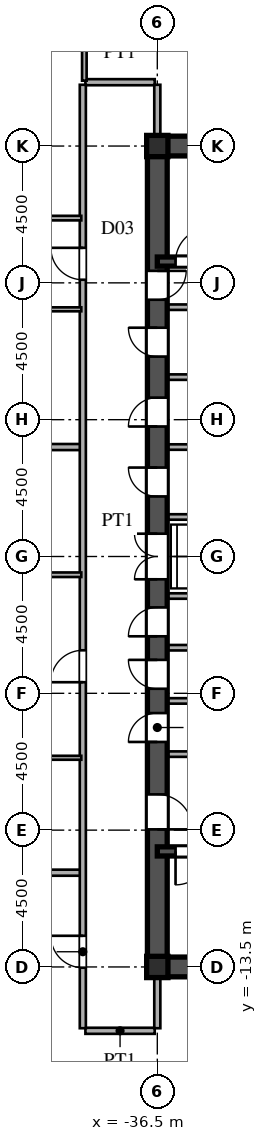
"""IFC4 building model, lengths in metres.
Left out: names, types, materials, properties, quantities, classifications, styles, units other than length and angle.
Written with IfcOpenShell. Run it as: python <this file> out.ifc"""

import sys

from ifc_helpers import new_model, si_unit, direction, frame, frame_2d, origin, origin_2d, place, context, subcontext, project, spatial, rectangle, i_section, extrude, source, transform, mapped, element, fill, save


model = new_model("IFC4")
c1 = context("Model", 3, precision=1e-05, world=origin(), true_north=direction((0.0, 1.0)))
c2 = subcontext(c1, "Body", "Model", "MODEL_VIEW")
j1 = project(units=[si_unit("LENGTHUNIT", "METRE"), si_unit("PLANEANGLEUNIT", "RADIAN")], contexts=[c1])
p1 = place(None, origin())
s1 = spatial("IfcSite", under=j1, at=p1, CompositionType="ELEMENT")
p2 = place(p1, origin())
s2 = spatial("IfcBuilding", under=s1, at=p2, CompositionType="ELEMENT")
p3 = place(p2, frame((0.0, 0.0, 124.8)))
s3 = spatial("IfcBuildingStorey", under=s2, at=p3, CompositionType="ELEMENT", Elevation=124.8)
m1 = source(origin(), c2, "Body", "SweptSolid", [
    extrude(i_section(OverallWidth=0.7, OverallDepth=0.7, WebThickness=0.028, FlangeThickness=0.045, at=origin_2d()), origin(), (0.0, 0.0, 1.0), 3.6),
])
for number, where, z_axis, x_axis in (
    (1, (-36.5, -13.5, 0.0), (0.0, 0.0, 1.0), (1.0, 0.0, 0.0)),
    (2, (-36.5, 13.5, 0.0), (0.0, 0.0, 1.0), (1.0, 0.0, 0.0)),
):
    element("IfcColumn", number, at=place(p3, frame(where, z_axis=z_axis, x_axis=x_axis)), inside=s3, PredefinedType="COLUMN", context=c2, shape_type="MappedRepresentation", body=[
        mapped(m1, transform((0.0, 0.0, 0.0), scale=1.0)),
    ])
for number, where, z_axis, x_axis in (
    (3, (-36.5, -13.5, 0.0), (0.0, 0.0, 1.0), (1.0, 0.0, 0.0)),
    (4, (-36.5, 13.5, 0.0), (0.0, 0.0, 1.0), (1.0, 0.0, 0.0)),
):
    element("IfcWall", number, at=place(p3, frame(where, z_axis=z_axis, x_axis=x_axis)), inside=s3, PredefinedType="SHEAR", context=c2, shape_type="SweptSolid", body=[
        extrude(rectangle(XDim=9.0, YDim=0.65, at=frame_2d((4.5, 0.0))), origin(), (0.0, 0.0, 1.0), 3.38),
    ])
p4 = place(p3, frame((-36.5, -13.65, 0.0), z_axis=(0.0, 0.0, 1.0), x_axis=(0.0, 1.0, 0.0)))
e5 = element("IfcWall", 5, at=p4, inside=s3, PredefinedType="SHEAR", context=c2, shape_type="SweptSolid", body=[
    extrude(rectangle(XDim=7.15, YDim=0.65, at=frame_2d((3.575, 0.0))), origin(), (0.0, 0.0, 1.0), 3.38),
])
p5 = place(p4, frame((4.675, 0.0, 0.0)))
e6 = element("IfcOpeningElement", 6, at=p5, cuts=e5, PredefinedType="OPENING", context=c2, shape_type="SweptSolid", body=[
    extrude(rectangle(XDim=1.15, YDim=2.2, at=frame_2d((0.575, 1.1))), frame((0.0, 0.335, 0.0), z_axis=(0.0, -1.0, 0.0), x_axis=(1.0, 0.0, 0.0)), (0.0, 0.0, 1.0), 0.67),
])
p6 = place(p3, frame((-36.5, -1.3, 0.0), z_axis=(0.0, 0.0, 1.0), x_axis=(0.0, 1.0, 0.0)))
e7 = element("IfcWall", 7, at=p6, inside=s3, PredefinedType="SHEAR", context=c2, shape_type="SweptSolid", body=[
    extrude(rectangle(XDim=2.6, YDim=0.65, at=frame_2d((1.3, 0.0))), origin(), (0.0, 0.0, 1.0), 3.38),
])
p7 = place(p6, frame((0.55, 0.0, 0.0)))
e8 = element("IfcOpeningElement", 8, at=p7, cuts=e7, PredefinedType="OPENING", context=c2, shape_type="SweptSolid", body=[
    extrude(rectangle(XDim=1.5, YDim=2.3, at=frame_2d((0.75, 1.15))), frame((0.0, 0.335, 0.0), z_axis=(0.0, -1.0, 0.0), x_axis=(1.0, 0.0, 0.0)), (0.0, 0.0, 1.0), 0.67),
])
p8 = place(p3, frame((-36.5, 8.2, 0.0), z_axis=(0.0, 0.0, 1.0), x_axis=(0.0, 1.0, 0.0)))
e9 = element("IfcWall", 9, at=p8, inside=s3, PredefinedType="SHEAR", context=c2, shape_type="SweptSolid", body=[
    extrude(rectangle(XDim=5.45, YDim=0.65, at=frame_2d((2.725, 0.0))), origin(), (0.0, 0.0, 1.0), 3.38),
])
p9 = place(p8, frame((0.245, 0.0, 0.0)))
e10 = element("IfcOpeningElement", 10, at=p9, cuts=e9, PredefinedType="OPENING", context=c2, shape_type="SweptSolid", body=[
    extrude(rectangle(XDim=0.95, YDim=2.15, at=frame_2d((0.475, 1.075))), frame((0.0, 0.335, 0.0), z_axis=(0.0, -1.0, 0.0), x_axis=(1.0, 0.0, 0.0)), (0.0, 0.0, 1.0), 0.67),
])
p10 = place(p3, frame((-36.5, -6.5, 0.0), z_axis=(0.0, 0.0, 1.0), x_axis=(0.0, 1.0, 0.0)))
e11 = element("IfcWall", 11, at=p10, inside=s3, PredefinedType="SHEAR", context=c2, shape_type="SweptSolid", body=[
    extrude(rectangle(XDim=1.75, YDim=0.65, at=frame_2d((0.875, 0.0))), origin(), (0.0, 0.0, 1.0), 3.38),
])
p11 = place(p10, frame((0.4, 0.0, 0.0)))
e12 = element("IfcOpeningElement", 12, at=p11, cuts=e11, PredefinedType="OPENING", context=c2, shape_type="SweptSolid", body=[
    extrude(rectangle(XDim=0.95, YDim=2.15, at=frame_2d((0.475, 1.075))), frame((0.0, 0.335, 0.0), z_axis=(0.0, -1.0, 0.0), x_axis=(1.0, 0.0, 0.0)), (0.0, 0.0, 1.0), 0.67),
])
p12 = place(p3, frame((-36.5, -4.75, 0.0), z_axis=(0.0, 0.0, 1.0), x_axis=(0.0, 1.0, 0.0)))
e13 = element("IfcWall", 13, at=p12, inside=s3, PredefinedType="SHEAR", context=c2, shape_type="SweptSolid", body=[
    extrude(rectangle(XDim=1.75, YDim=0.65, at=frame_2d((0.875, 0.0))), origin(), (0.0, 0.0, 1.0), 3.38),
])
p13 = place(p12, frame((0.4, 0.0, 0.0)))
e14 = element("IfcOpeningElement", 14, at=p13, cuts=e13, PredefinedType="OPENING", context=c2, shape_type="SweptSolid", body=[
    extrude(rectangle(XDim=0.95, YDim=2.15, at=frame_2d((0.475, 1.075))), frame((0.0, 0.335, 0.0), z_axis=(0.0, -1.0, 0.0), x_axis=(1.0, 0.0, 0.0)), (0.0, 0.0, 1.0), 0.67),
])
p14 = place(p3, frame((-36.5, -3.0, 0.0), z_axis=(0.0, 0.0, 1.0), x_axis=(0.0, 1.0, 0.0)))
e15 = element("IfcWall", 15, at=p14, inside=s3, PredefinedType="SHEAR", context=c2, shape_type="SweptSolid", body=[
    extrude(rectangle(XDim=1.7, YDim=0.65, at=frame_2d((0.85, 0.0))), origin(), (0.0, 0.0, 1.0), 3.38),
])
p15 = place(p14, frame((0.375, 0.0, 0.0)))
e16 = element("IfcOpeningElement", 16, at=p15, cuts=e15, PredefinedType="OPENING", context=c2, shape_type="SweptSolid", body=[
    extrude(rectangle(XDim=0.95, YDim=2.15, at=frame_2d((0.475, 1.075))), frame((0.0, 0.335, 0.0), z_axis=(0.0, -1.0, 0.0), x_axis=(1.0, 0.0, 0.0)), (0.0, 0.0, 1.0), 0.67),
])
p16 = place(p3, frame((-36.5, 1.3, 0.0), z_axis=(0.0, 0.0, 1.0), x_axis=(0.0, 1.0, 0.0)))
e17 = element("IfcWall", 17, at=p16, inside=s3, PredefinedType="SHEAR", context=c2, shape_type="SweptSolid", body=[
    extrude(rectangle(XDim=2.3, YDim=0.65, at=frame_2d((1.15, 0.0))), origin(), (0.0, 0.0, 1.0), 3.38),
])
p17 = place(p16, frame((0.675, 0.0, 0.0)))
e18 = element("IfcOpeningElement", 18, at=p17, cuts=e17, PredefinedType="OPENING", context=c2, shape_type="SweptSolid", body=[
    extrude(rectangle(XDim=0.95, YDim=2.15, at=frame_2d((0.475, 1.075))), frame((0.0, 0.335, 0.0), z_axis=(0.0, -1.0, 0.0), x_axis=(1.0, 0.0, 0.0)), (0.0, 0.0, 1.0), 0.67),
])
p18 = place(p3, frame((-36.5, 3.6, 0.0), z_axis=(0.0, 0.0, 1.0), x_axis=(0.0, 1.0, 0.0)))
e19 = element("IfcWall", 19, at=p18, inside=s3, PredefinedType="SHEAR", context=c2, shape_type="SweptSolid", body=[
    extrude(rectangle(XDim=2.3, YDim=0.65, at=frame_2d((1.15, 0.0))), origin(), (0.0, 0.0, 1.0), 3.38),
])
p19 = place(p18, frame((0.675, 0.0, 0.0)))
e20 = element("IfcOpeningElement", 20, at=p19, cuts=e19, PredefinedType="OPENING", context=c2, shape_type="SweptSolid", body=[
    extrude(rectangle(XDim=0.95, YDim=2.15, at=frame_2d((0.475, 1.075))), frame((0.0, 0.335, 0.0), z_axis=(0.0, -1.0, 0.0), x_axis=(1.0, 0.0, 0.0)), (0.0, 0.0, 1.0), 0.67),
])
p20 = place(p3, frame((-36.5, 5.9, 0.0), z_axis=(0.0, 0.0, 1.0), x_axis=(0.0, 1.0, 0.0)))
e21 = element("IfcWall", 21, at=p20, inside=s3, PredefinedType="SHEAR", context=c2, shape_type="SweptSolid", body=[
    extrude(rectangle(XDim=2.3, YDim=0.65, at=frame_2d((1.15, 0.0))), origin(), (0.0, 0.0, 1.0), 3.38),
])
p21 = place(p20, frame((0.675, 0.0, 0.0)))
e22 = element("IfcOpeningElement", 22, at=p21, cuts=e21, PredefinedType="OPENING", context=c2, shape_type="SweptSolid", body=[
    extrude(rectangle(XDim=0.95, YDim=2.15, at=frame_2d((0.475, 1.075))), frame((0.0, 0.335, 0.0), z_axis=(0.0, -1.0, 0.0), x_axis=(1.0, 0.0, 0.0)), (0.0, 0.0, 1.0), 0.67),
])
p22 = place(p3, frame((-36.5, -9.7, 0.0), z_axis=(0.0, 0.0, 1.0), x_axis=(1.0, 0.0, 0.0)))
e23 = element("IfcWall", 23, at=p22, inside=s3, PredefinedType="SHEAR", context=c2, shape_type="SweptSolid", body=[
    extrude(rectangle(XDim=9.0, YDim=0.3, at=frame_2d((4.5, 0.0))), origin(), (0.0, 0.0, 1.0), 3.38),
])
p23 = place(p22, frame((0.6, 0.0, 0.0)))
e24 = element("IfcOpeningElement", 24, at=p23, cuts=e23, PredefinedType="OPENING", context=c2, shape_type="SweptSolid", body=[
    extrude(rectangle(XDim=1.1, YDim=2.2, at=frame_2d((0.55, 1.1))), frame((0.0, 0.16, 0.0), z_axis=(0.0, -1.0, 0.0), x_axis=(1.0, 0.0, 0.0)), (0.0, 0.0, 1.0), 0.32),
])
p24 = place(p3, frame((-36.5, 9.7, 0.0), z_axis=(0.0, 0.0, 1.0), x_axis=(1.0, 0.0, 0.0)))
e25 = element("IfcWall", 25, at=p24, inside=s3, PredefinedType="SHEAR", context=c2, shape_type="SweptSolid", body=[
    extrude(rectangle(XDim=9.0, YDim=0.3, at=frame_2d((4.5, 0.0))), origin(), (0.0, 0.0, 1.0), 3.38),
])
p25 = place(p24, frame((0.6, 0.0, 0.0)))
e26 = element("IfcOpeningElement", 26, at=p25, cuts=e25, PredefinedType="OPENING", context=c2, shape_type="SweptSolid", body=[
    extrude(rectangle(XDim=1.1, YDim=2.2, at=frame_2d((0.55, 1.1))), frame((0.0, 0.16, 0.0), z_axis=(0.0, -1.0, 0.0), x_axis=(1.0, 0.0, 0.0)), (0.0, 0.0, 1.0), 0.32),
])
for number, where, z_axis, x_axis in (
    (27, (-36.15, -6.5, 0.0), (0.0, 0.0, 1.0), (1.0, 0.0, 0.0)),
    (28, (-36.15, 8.2, 0.0), (0.0, 0.0, 1.0), (1.0, 0.0, 0.0)),
):
    element("IfcWall", number, at=place(p3, frame(where, z_axis=z_axis, x_axis=x_axis)), inside=s3, PredefinedType="PARTITIONING", context=c2, shape_type="SweptSolid", body=[
        extrude(rectangle(XDim=5.7, YDim=0.18, at=frame_2d((2.85, 0.0))), origin(), (0.0, 0.0, 1.0), 3.38),
    ])
for number, where, z_axis, x_axis in (
    (29, (-36.15, -1.3, 0.0), (0.0, 0.0, 1.0), (1.0, 0.0, 0.0)),
    (30, (-36.15, 1.3, 0.0), (0.0, 0.0, 1.0), (1.0, 0.0, 0.0)),
    (31, (-36.15, -4.75, 0.0), (0.0, 0.0, 1.0), (1.0, 0.0, 0.0)),
    (32, (-36.15, -3.0, 0.0), (0.0, 0.0, 1.0), (1.0, 0.0, 0.0)),
    (33, (-36.15, 3.6, 0.0), (0.0, 0.0, 1.0), (1.0, 0.0, 0.0)),
    (34, (-36.15, 5.9, 0.0), (0.0, 0.0, 1.0), (1.0, 0.0, 0.0)),
):
    element("IfcWall", number, at=place(p3, frame(where, z_axis=z_axis, x_axis=x_axis)), inside=s3, PredefinedType="PARTITIONING", context=c2, shape_type="SweptSolid", body=[
        extrude(rectangle(XDim=2.95, YDim=0.18, at=frame_2d((1.475, 0.0))), origin(), (0.0, 0.0, 1.0), 3.38),
    ])
p26 = place(p3, frame((-38.865, -15.6, 0.0), z_axis=(0.0, 0.0, 1.0), x_axis=(1.0, 0.0, 0.0)))
e35 = element("IfcWall", 35, at=p26, inside=s3, PredefinedType="PARTITIONING", context=c2, shape_type="SweptSolid", body=[
    extrude(rectangle(XDim=2.28, YDim=0.2, at=frame_2d((1.14, 0.0))), origin(), (0.0, 0.0, 1.0), 3.38),
])
p27 = place(p3, frame((-58.988, -10.4, 0.0), z_axis=(0.0, 0.0, 1.0), x_axis=(1.0, 0.0, 0.0)))
e36 = element("IfcWall", 36, at=p27, inside=s3, PredefinedType="PARTITIONING", context=c2, shape_type="SweptSolid", body=[
    extrude(rectangle(XDim=19.958, YDim=0.2, at=frame_2d((9.979, 0.0))), origin(), (0.0, 0.0, 1.0), 3.38),
])
p28 = place(p3, frame((-42.35, -6.62, 0.0), z_axis=(0.0, 0.0, 1.0), x_axis=(1.0, 0.0, 0.0)))
e37 = element("IfcWall", 37, at=p28, inside=s3, PredefinedType="PARTITIONING", context=c2, shape_type="SweptSolid", body=[
    extrude(rectangle(XDim=3.35, YDim=0.13, at=frame_2d((1.675, 0.0))), origin(), (0.0, 0.0, 1.0), 3.38),
])
p29 = place(p28, frame((1.235, 0.0, 0.0)))
e38 = element("IfcOpeningElement", 38, at=p29, cuts=e37, PredefinedType="OPENING", context=c2, shape_type="SweptSolid", body=[
    extrude(rectangle(XDim=0.88, YDim=2.1, at=frame_2d((0.44, 1.05))), frame((0.0, 0.075, 0.0), z_axis=(0.0, -1.0, 0.0), x_axis=(1.0, 0.0, 0.0)), (0.0, 0.0, 1.0), 0.15),
])
p30 = place(p3, frame((-42.35, -0.6, 0.0), z_axis=(0.0, 0.0, 1.0), x_axis=(1.0, 0.0, 0.0)))
e39 = element("IfcWall", 39, at=p30, inside=s3, PredefinedType="PARTITIONING", context=c2, shape_type="SweptSolid", body=[
    extrude(rectangle(XDim=3.35, YDim=0.15, at=frame_2d((1.675, 0.0))), origin(), (0.0, 0.0, 1.0), 3.38),
])
p31 = place(p30, frame((1.2, 0.0, 0.0)))
e40 = element("IfcOpeningElement", 40, at=p31, cuts=e39, PredefinedType="OPENING", context=c2, shape_type="SweptSolid", body=[
    extrude(rectangle(XDim=0.95, YDim=2.15, at=frame_2d((0.475, 1.075))), frame((0.0, 0.085, 0.0), z_axis=(0.0, -1.0, 0.0), x_axis=(1.0, 0.0, 0.0)), (0.0, 0.0, 1.0), 0.17),
])
p32 = place(p3, frame((-69.505, 3.6, 0.0), z_axis=(0.0, 0.0, 1.0), x_axis=(1.0, 0.0, 0.0)))
e41 = element("IfcWall", 41, at=p32, inside=s3, PredefinedType="PARTITIONING", context=c2, shape_type="SweptSolid", body=[
    extrude(rectangle(XDim=30.475, YDim=0.2, at=frame_2d((15.237, 0.0))), origin(), (0.0, 0.0, 1.0), 3.38),
])
p33 = place(p3, frame((-42.35, 8.13, 0.0), z_axis=(0.0, 0.0, 1.0), x_axis=(1.0, 0.0, 0.0)))
e42 = element("IfcWall", 42, at=p33, inside=s3, PredefinedType="PARTITIONING", context=c2, shape_type="SweptSolid", body=[
    extrude(rectangle(XDim=3.35, YDim=0.13, at=frame_2d((1.675, 0.0))), origin(), (0.0, 0.0, 1.0), 3.38),
])
p34 = place(p33, frame((1.235, 0.0, 0.0)))
e43 = element("IfcOpeningElement", 43, at=p34, cuts=e42, PredefinedType="OPENING", context=c2, shape_type="SweptSolid", body=[
    extrude(rectangle(XDim=0.88, YDim=2.1, at=frame_2d((0.44, 1.05))), frame((0.0, 0.075, 0.0), z_axis=(0.0, -1.0, 0.0), x_axis=(1.0, 0.0, 0.0)), (0.0, 0.0, 1.0), 0.15),
])
p35 = place(p3, frame((-42.35, 11.13, 0.0), z_axis=(0.0, 0.0, 1.0), x_axis=(1.0, 0.0, 0.0)))
e44 = element("IfcWall", 44, at=p35, inside=s3, PredefinedType="PARTITIONING", context=c2, shape_type="SweptSolid", body=[
    extrude(rectangle(XDim=3.35, YDim=0.15, at=frame_2d((1.675, 0.0))), origin(), (0.0, 0.0, 1.0), 3.38),
])
p36 = place(p35, frame((1.2, 0.0, 0.0)))
e45 = element("IfcOpeningElement", 45, at=p36, cuts=e44, PredefinedType="OPENING", context=c2, shape_type="SweptSolid", body=[
    extrude(rectangle(XDim=0.95, YDim=2.15, at=frame_2d((0.475, 1.075))), frame((0.0, 0.085, 0.0), z_axis=(0.0, -1.0, 0.0), x_axis=(1.0, 0.0, 0.0)), (0.0, 0.0, 1.0), 0.17),
])
p37 = place(p3, frame((-38.865, 15.6, 0.0), z_axis=(0.0, 0.0, 1.0), x_axis=(1.0, 0.0, 0.0)))
e46 = element("IfcWall", 46, at=p37, inside=s3, PredefinedType="PARTITIONING", context=c2, shape_type="SweptSolid", body=[
    extrude(rectangle(XDim=2.28, YDim=0.2, at=frame_2d((1.14, 0.0))), origin(), (0.0, 0.0, 1.0), 3.38),
])
p38 = place(p3, frame((-38.95, -15.515, 0.0), z_axis=(0.0, 0.0, 1.0), x_axis=(0.0, 1.0, 0.0)))
e47 = element("IfcWall", 47, at=p38, inside=s3, PredefinedType="PARTITIONING", context=c2, shape_type="SweptSolid", body=[
    extrude(rectangle(XDim=31.03, YDim=0.2, at=frame_2d((15.515, 0.0))), origin(), (0.0, 0.0, 1.0), 3.38),
])
p39 = place(p38, frame((1.99, 0.0, 0.0)))
e48 = element("IfcOpeningElement", 48, at=p39, cuts=e47, PredefinedType="OPENING", context=c2, shape_type="SweptSolid", body=[
    extrude(rectangle(XDim=1.05, YDim=2.25, at=frame_2d((0.525, 1.125))), frame((0.0, 0.11, 0.0), z_axis=(0.0, -1.0, 0.0), x_axis=(1.0, 0.0, 0.0)), (0.0, 0.0, 1.0), 0.22),
])
p40 = place(p38, frame((11.38, 0.0, 0.0)))
e49 = element("IfcOpeningElement", 49, at=p40, cuts=e47, PredefinedType="OPENING", context=c2, shape_type="SweptSolid", body=[
    extrude(rectangle(XDim=1.05, YDim=2.25, at=frame_2d((0.525, 1.125))), frame((0.0, 0.11, 0.0), z_axis=(0.0, -1.0, 0.0), x_axis=(1.0, 0.0, 0.0)), (0.0, 0.0, 1.0), 0.22),
])
p41 = place(p38, frame((24.617, 0.0, 0.0)))
e50 = element("IfcOpeningElement", 50, at=p41, cuts=e47, PredefinedType="OPENING", context=c2, shape_type="SweptSolid", body=[
    extrude(rectangle(XDim=1.05, YDim=2.25, at=frame_2d((0.525, 1.125))), frame((0.0, 0.11, 0.0), z_axis=(0.0, -1.0, 0.0), x_axis=(1.0, 0.0, 0.0)), (0.0, 0.0, 1.0), 0.22),
])
p42 = place(p3, frame((-38.9, 15.65, 0.0), z_axis=(0.0, 0.0, 1.0), x_axis=(0.0, 1.0, 0.0)))
e51 = element("IfcWall", 51, at=p42, inside=s3, PredefinedType="PARTITIONING", context=c2, shape_type="SweptSolid", body=[
    extrude(rectangle(XDim=5.088, YDim=0.15, at=frame_2d((2.544, 0.0))), origin(), (0.0, 0.0, 1.0), 3.38),
])
p43 = place(p42, frame((1.175, 0.0, 0.0)))
e52 = element("IfcOpeningElement", 52, at=p43, cuts=e51, PredefinedType="OPENING", context=c2, shape_type="SweptSolid", body=[
    extrude(rectangle(XDim=0.95, YDim=2.15, at=frame_2d((0.475, 1.075))), frame((0.0, 0.085, 0.0), z_axis=(0.0, -1.0, 0.0), x_axis=(1.0, 0.0, 0.0)), (0.0, 0.0, 1.0), 0.17),
])
for number, where, z_axis, x_axis in (
    (53, (-36.5, -15.515, 0.0), (0.0, 0.0, 1.0), (0.0, 1.0, 0.0)),
    (54, (-36.5, 13.83, 0.0), (0.0, 0.0, 1.0), (0.0, 1.0, 0.0)),
):
    element("IfcWall", number, at=place(p3, frame(where, z_axis=z_axis, x_axis=x_axis)), inside=s3, PredefinedType="PARTITIONING", context=c2, shape_type="SweptSolid", body=[
        extrude(rectangle(XDim=1.685, YDim=0.2, at=frame_2d((0.842, 0.0))), origin(), (0.0, 0.0, 1.0), 2.78),
    ])
m2 = source(origin(), c2, "Body", "SweptSolid", [
    extrude(rectangle(XDim=1.15, YDim=2.2, at=frame_2d((0.575, 1.1))), frame((0.0, 0.025, 0.0), z_axis=(0.0, -1.0, 0.0), x_axis=(1.0, 0.0, 0.0)), (0.0, 0.0, 1.0), 0.05),
])
p44 = place(p5, frame((1.15, 0.0, 0.0), z_axis=(0.0, 0.0, 1.0), x_axis=(-1.0, 0.0, 0.0)))
e55 = element("IfcDoor", 55, at=p44, inside=s3, OperationType="SINGLE_SWING_LEFT", PredefinedType="DOOR", context=c2, shape_type="MappedRepresentation", body=[
    mapped(m2, transform((0.0, 0.0, 0.0), scale=1.0)),
])
fill(e6, e55)
m3 = source(origin(), c2, "Body", "SweptSolid", [
    extrude(rectangle(XDim=1.5, YDim=2.3, at=frame_2d((0.75, 1.15))), frame((0.0, 0.025, 0.0), z_axis=(0.0, -1.0, 0.0), x_axis=(1.0, 0.0, 0.0)), (0.0, 0.0, 1.0), 0.05),
])
p45 = place(p7, origin())
e56 = element("IfcDoor", 56, at=p45, inside=s3, OperationType="DOUBLE_SWING_LEFT", PredefinedType="DOOR", context=c2, shape_type="MappedRepresentation", body=[
    mapped(m3, transform((0.0, 0.0, 0.0), scale=1.0)),
])
fill(e8, e56)
m4 = source(origin(), c2, "Body", "SweptSolid", [
    extrude(rectangle(XDim=0.95, YDim=2.15, at=frame_2d((0.475, 1.075))), frame((0.0, 0.025, 0.0), z_axis=(0.0, -1.0, 0.0), x_axis=(1.0, 0.0, 0.0)), (0.0, 0.0, 1.0), 0.05),
])
p46 = place(p9, frame((0.95, 0.0, 0.0), z_axis=(0.0, 0.0, 1.0), x_axis=(-1.0, 0.0, 0.0)))
e57 = element("IfcDoor", 57, at=p46, inside=s3, OperationType="SINGLE_SWING_RIGHT", PredefinedType="DOOR", context=c2, shape_type="MappedRepresentation", body=[
    mapped(m4, transform((0.0, 0.0, 0.0), scale=1.0)),
])
fill(e10, e57)
p47 = place(p11, origin())
e58 = element("IfcDoor", 58, at=p47, inside=s3, OperationType="SINGLE_SWING_LEFT", PredefinedType="DOOR", context=c2, shape_type="MappedRepresentation", body=[
    mapped(m4, transform((0.0, 0.0, 0.0), scale=1.0)),
])
fill(e12, e58)
p48 = place(p13, origin())
e59 = element("IfcDoor", 59, at=p48, inside=s3, OperationType="SINGLE_SWING_RIGHT", PredefinedType="DOOR", context=c2, shape_type="MappedRepresentation", body=[
    mapped(m4, transform((0.0, 0.0, 0.0), scale=1.0)),
])
fill(e14, e59)
p49 = place(p15, origin())
e60 = element("IfcDoor", 60, at=p49, inside=s3, OperationType="SINGLE_SWING_LEFT", PredefinedType="DOOR", context=c2, shape_type="MappedRepresentation", body=[
    mapped(m4, transform((0.0, 0.0, 0.0), scale=1.0)),
])
fill(e16, e60)
p50 = place(p17, origin())
e61 = element("IfcDoor", 61, at=p50, inside=s3, OperationType="SINGLE_SWING_RIGHT", PredefinedType="DOOR", context=c2, shape_type="MappedRepresentation", body=[
    mapped(m4, transform((0.0, 0.0, 0.0), scale=1.0)),
])
fill(e18, e61)
p51 = place(p19, origin())
e62 = element("IfcDoor", 62, at=p51, inside=s3, OperationType="SINGLE_SWING_LEFT", PredefinedType="DOOR", context=c2, shape_type="MappedRepresentation", body=[
    mapped(m4, transform((0.0, 0.0, 0.0), scale=1.0)),
])
fill(e20, e62)
p52 = place(p21, origin())
e63 = element("IfcDoor", 63, at=p52, inside=s3, OperationType="SINGLE_SWING_RIGHT", PredefinedType="DOOR", context=c2, shape_type="MappedRepresentation", body=[
    mapped(m4, transform((0.0, 0.0, 0.0), scale=1.0)),
])
fill(e22, e63)
m5 = source(origin(), c2, "Body", "SweptSolid", [
    extrude(rectangle(XDim=1.1, YDim=2.2, at=frame_2d((0.55, 1.1))), frame((0.0, 0.025, 0.0), z_axis=(0.0, -1.0, 0.0), x_axis=(1.0, 0.0, 0.0)), (0.0, 0.0, 1.0), 0.05),
])
p53 = place(p23, frame((1.1, 0.0, 0.0), z_axis=(0.0, 0.0, 1.0), x_axis=(-1.0, 0.0, 0.0)))
e64 = element("IfcDoor", 64, at=p53, inside=s3, OperationType="SINGLE_SWING_LEFT", PredefinedType="DOOR", context=c2, shape_type="MappedRepresentation", body=[
    mapped(m5, transform((0.0, 0.0, 0.0), scale=1.0)),
])
fill(e24, e64)
p54 = place(p25, origin())
e65 = element("IfcDoor", 65, at=p54, inside=s3, OperationType="SINGLE_SWING_RIGHT", PredefinedType="DOOR", context=c2, shape_type="MappedRepresentation", body=[
    mapped(m5, transform((0.0, 0.0, 0.0), scale=1.0)),
])
fill(e26, e65)
m6 = source(origin(), c2, "Body", "SweptSolid", [
    extrude(rectangle(XDim=1.05, YDim=2.25, at=frame_2d((0.525, 1.125))), frame((0.0, 0.025, 0.0), z_axis=(0.0, -1.0, 0.0), x_axis=(1.0, 0.0, 0.0)), (0.0, 0.0, 1.0), 0.05),
])
p55 = place(p39, origin())
e66 = element("IfcDoor", 66, at=p55, inside=s3, OperationType="SINGLE_SWING_RIGHT", PredefinedType="DOOR", context=c2, shape_type="MappedRepresentation", body=[
    mapped(m6, transform((0.0, 0.0, 0.0), scale=1.0)),
])
fill(e48, e66)
p56 = place(p40, origin())
e67 = element("IfcDoor", 67, at=p56, inside=s3, OperationType="SINGLE_SWING_LEFT", PredefinedType="DOOR", context=c2, shape_type="MappedRepresentation", body=[
    mapped(m6, transform((0.0, 0.0, 0.0), scale=1.0)),
])
fill(e49, e67)
p57 = place(p41, origin())
e68 = element("IfcDoor", 68, at=p57, inside=s3, OperationType="SINGLE_SWING_RIGHT", PredefinedType="DOOR", context=c2, shape_type="MappedRepresentation", body=[
    mapped(m6, transform((0.0, 0.0, 0.0), scale=1.0)),
])
fill(e50, e68)
save(model, sys.argv[1])
